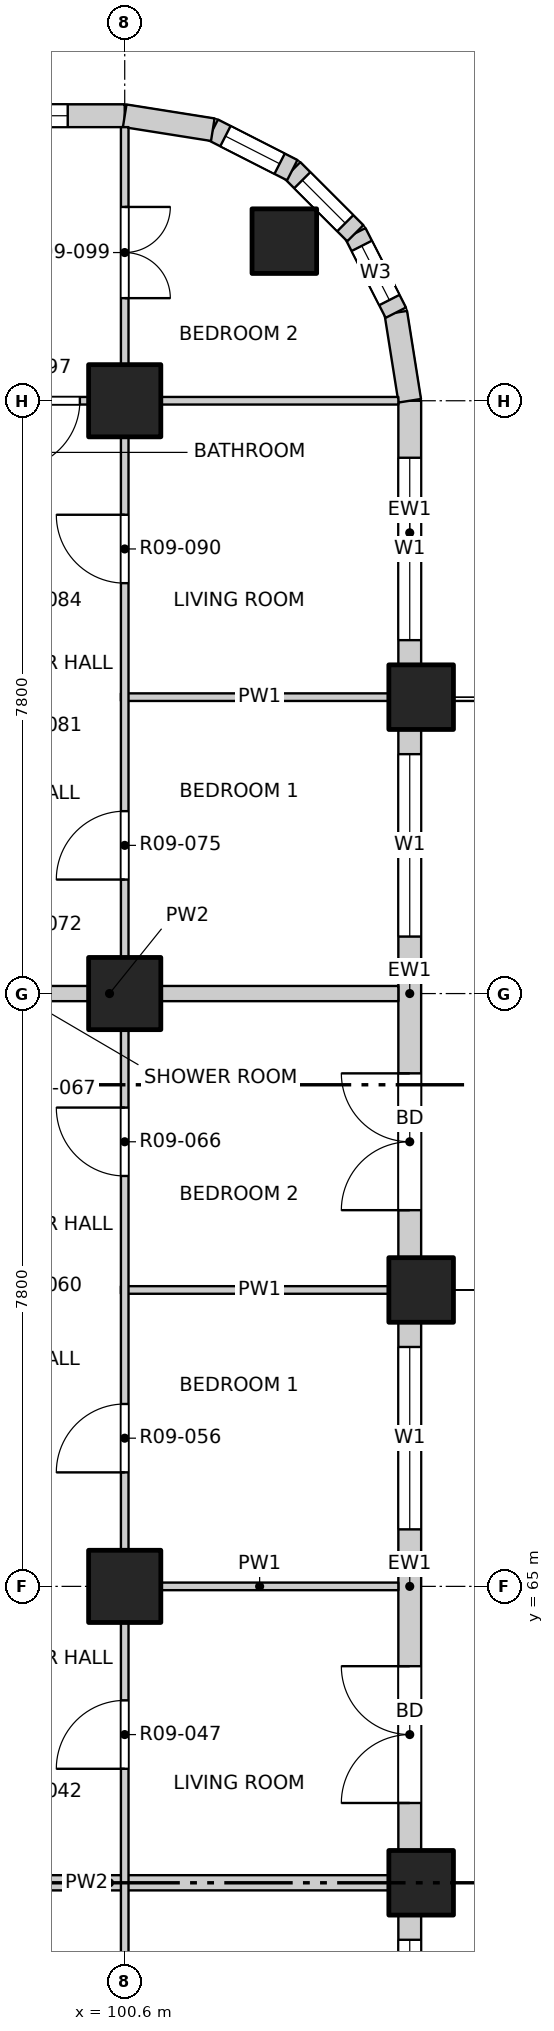
"""IFC4 building model, lengths in metres.
Left out: names, types, materials, properties, quantities, classifications, styles, units other than length and angle.
Written with IfcOpenShell. Run it as: python <this file> out.ifc"""

import sys

from ifc_helpers import new_model, si_unit, direction, frame, frame_2d, origin, origin_2d, place, context, subcontext, project, spatial, rectangle, extrude, element, fill, save


model = new_model("IFC4")
c1 = context("Model", 3, precision=1e-05, world=origin(), true_north=direction((0.0, 1.0)))
c2 = subcontext(c1, "Body", "Model", "MODEL_VIEW")
j1 = project(units=[si_unit("LENGTHUNIT", "METRE"), si_unit("PLANEANGLEUNIT", "RADIAN")], contexts=[c1])
p1 = place(None, origin())
s1 = spatial("IfcSite", under=j1, at=p1, CompositionType="ELEMENT")
p2 = place(p1, origin())
s2 = spatial("IfcBuilding", under=s1, at=p2, CompositionType="ELEMENT")
p3 = place(p2, frame((0.0, 0.0, 113.5)))
s3 = spatial("IfcBuildingStorey", under=s2, at=p3, CompositionType="ELEMENT", Elevation=113.5)
for number, where, z_axis, x_axis in (
    (1, (102.7, 82.7, -0.25), (0.0, 0.0, 1.0), (1.0, 0.0, 0.0)),
    (2, (104.5, 61.1, -0.25), (0.0, 0.0, 1.0), (1.0, 0.0, 0.0)),
    (3, (104.5, 68.9, -0.25), (0.0, 0.0, 1.0), (1.0, 0.0, 0.0)),
    (4, (104.5, 76.7, -0.25), (0.0, 0.0, 1.0), (1.0, 0.0, 0.0)),
):
    element("IfcColumn", number, at=place(p3, frame(where, z_axis=z_axis, x_axis=x_axis)), inside=s3, PredefinedType="COLUMN", context=c2, shape_type="SweptSolid", body=[
        extrude(rectangle(XDim=0.85, YDim=0.85, at=origin_2d()), origin(), (0.0, 0.0, 1.0), 3.35),
    ])
for number, where, z_axis, x_axis in (
    (5, (100.6, 65.0, -0.25), (0.0, 0.0, 1.0), (1.0, 0.0, 0.0)),
    (6, (100.6, 72.8, -0.25), (0.0, 0.0, 1.0), (1.0, 0.0, 0.0)),
    (7, (100.6, 80.6, -0.25), (0.0, 0.0, 1.0), (1.0, 0.0, 0.0)),
):
    element("IfcColumn", number, at=place(p3, frame(where, z_axis=z_axis, x_axis=x_axis)), inside=s3, PredefinedType="COLUMN", context=c2, shape_type="SweptSolid", body=[
        extrude(rectangle(XDim=0.95, YDim=0.95, at=origin_2d()), origin(), (0.0, 0.0, 1.0), 3.35),
    ])
p4 = place(p3, frame((104.35, 53.725, 0.0), z_axis=(0.0, 0.0, 1.0), x_axis=(0.0, 1.0, 0.0)))
e8 = element("IfcWall", 8, at=p4, inside=s3, PredefinedType="SOLIDWALL", context=c2, shape_type="SweptSolid", body=[
    extrude(rectangle(XDim=6.95, YDim=0.3, at=frame_2d((3.475, 0.0))), origin(), (0.0, 0.0, 1.0), 3.1),
])
p5 = place(p4, frame((0.625, 0.0, 0.0)))
e9 = element("IfcOpeningElement", 9, at=p5, cuts=e8, PredefinedType="OPENING", context=c2, shape_type="SweptSolid", body=[
    extrude(rectangle(XDim=1.8, YDim=2.4, at=frame_2d((0.9, 1.2))), frame((0.0, 0.16, 0.0), z_axis=(0.0, -1.0, 0.0), x_axis=(1.0, 0.0, 0.0)), (0.0, 0.0, 1.0), 0.32),
])
p6 = place(p4, frame((4.225, 0.0, 0.9)))
e10 = element("IfcOpeningElement", 10, at=p6, cuts=e8, PredefinedType="OPENING", context=c2, shape_type="SweptSolid", body=[
    extrude(rectangle(XDim=2.4, YDim=1.8, at=frame_2d((1.2, 0.9))), frame((0.0, 0.16, 0.0), z_axis=(0.0, -1.0, 0.0), x_axis=(1.0, 0.0, 0.0)), (0.0, 0.0, 1.0), 0.32),
])
p7 = place(p3, frame((104.35, 61.525, 0.0), z_axis=(0.0, 0.0, 1.0), x_axis=(0.0, 1.0, 0.0)))
e11 = element("IfcWall", 11, at=p7, inside=s3, PredefinedType="SOLIDWALL", context=c2, shape_type="SweptSolid", body=[
    extrude(rectangle(XDim=6.95, YDim=0.3, at=frame_2d((3.475, 0.0))), origin(), (0.0, 0.0, 1.0), 3.1),
])
p8 = place(p7, frame((0.625, 0.0, 0.0)))
e12 = element("IfcOpeningElement", 12, at=p8, cuts=e11, PredefinedType="OPENING", context=c2, shape_type="SweptSolid", body=[
    extrude(rectangle(XDim=1.8, YDim=2.4, at=frame_2d((0.9, 1.2))), frame((0.0, 0.16, 0.0), z_axis=(0.0, -1.0, 0.0), x_axis=(1.0, 0.0, 0.0)), (0.0, 0.0, 1.0), 0.32),
])
p9 = place(p7, frame((4.225, 0.0, 0.9)))
e13 = element("IfcOpeningElement", 13, at=p9, cuts=e11, PredefinedType="OPENING", context=c2, shape_type="SweptSolid", body=[
    extrude(rectangle(XDim=2.4, YDim=1.8, at=frame_2d((1.2, 0.9))), frame((0.0, 0.16, 0.0), z_axis=(0.0, -1.0, 0.0), x_axis=(1.0, 0.0, 0.0)), (0.0, 0.0, 1.0), 0.32),
])
p10 = place(p3, frame((104.35, 69.325, 0.0), z_axis=(0.0, 0.0, 1.0), x_axis=(0.0, 1.0, 0.0)))
e14 = element("IfcWall", 14, at=p10, inside=s3, PredefinedType="SOLIDWALL", context=c2, shape_type="SweptSolid", body=[
    extrude(rectangle(XDim=6.95, YDim=0.3, at=frame_2d((3.475, 0.0))), origin(), (0.0, 0.0, 1.0), 3.1),
])
p11 = place(p10, frame((0.625, 0.0, 0.0)))
e15 = element("IfcOpeningElement", 15, at=p11, cuts=e14, PredefinedType="OPENING", context=c2, shape_type="SweptSolid", body=[
    extrude(rectangle(XDim=1.8, YDim=2.4, at=frame_2d((0.9, 1.2))), frame((0.0, 0.16, 0.0), z_axis=(0.0, -1.0, 0.0), x_axis=(1.0, 0.0, 0.0)), (0.0, 0.0, 1.0), 0.32),
])
p12 = place(p10, frame((4.225, 0.0, 0.9)))
e16 = element("IfcOpeningElement", 16, at=p12, cuts=e14, PredefinedType="OPENING", context=c2, shape_type="SweptSolid", body=[
    extrude(rectangle(XDim=2.4, YDim=1.8, at=frame_2d((1.2, 0.9))), frame((0.0, 0.16, 0.0), z_axis=(0.0, -1.0, 0.0), x_axis=(1.0, 0.0, 0.0)), (0.0, 0.0, 1.0), 0.32),
])
p13 = place(p3, frame((104.35, 77.125, 0.0), z_axis=(0.0, 0.0, 1.0), x_axis=(0.0, 1.0, 0.0)))
e17 = element("IfcWall", 17, at=p13, inside=s3, PredefinedType="SOLIDWALL", context=c2, shape_type="SweptSolid", body=[
    extrude(rectangle(XDim=3.475, YDim=0.3, at=frame_2d((1.738, 0.0))), origin(), (0.0, 0.0, 1.0), 3.1),
])
p14 = place(p13, frame((0.325, 0.0, 0.9)))
e18 = element("IfcOpeningElement", 18, at=p14, cuts=e17, PredefinedType="OPENING", context=c2, shape_type="SweptSolid", body=[
    extrude(rectangle(XDim=2.4, YDim=1.8, at=frame_2d((1.2, 0.9))), frame((0.0, 0.16, 0.0), z_axis=(0.0, -1.0, 0.0), x_axis=(1.0, 0.0, 0.0)), (0.0, 0.0, 1.0), 0.32),
])
p15 = place(p3, frame((97.125, 84.35, 0.0), z_axis=(0.0, 0.0, 1.0), x_axis=(1.0, 0.0, 0.0)))
e19 = element("IfcWall", 19, at=p15, inside=s3, PredefinedType="SOLIDWALL", context=c2, shape_type="SweptSolid", body=[
    extrude(rectangle(XDim=3.475, YDim=0.3, at=frame_2d((1.738, 0.0))), origin(), (0.0, 0.0, 1.0), 3.1),
])
p16 = place(p15, frame((0.325, 0.0, 0.9)))
e20 = element("IfcOpeningElement", 20, at=p16, cuts=e19, PredefinedType="OPENING", context=c2, shape_type="SweptSolid", body=[
    extrude(rectangle(XDim=2.4, YDim=1.8, at=frame_2d((1.2, 0.9))), frame((0.0, 0.16, 0.0), z_axis=(0.0, -1.0, 0.0), x_axis=(1.0, 0.0, 0.0)), (0.0, 0.0, 1.0), 0.32),
])
p17 = place(p3, frame((104.35, 80.6, 0.0), z_axis=(0.0, 0.0, 1.0), x_axis=(-0.156496880861, 0.987678452879, 0.0)))
e21 = element("IfcWall", 21, at=p17, inside=s3, PredefinedType="SOLIDWALL", context=c2, shape_type="SweptSolid", body=[
    extrude(rectangle(XDim=1.173, YDim=0.3, at=frame_2d((0.586, 0.0))), origin(), (0.0, 0.0, 1.0), 3.1),
])
p18 = place(p3, frame((104.167, 81.759, 0.0), z_axis=(0.0, 0.0, 1.0), x_axis=(-0.454025524128, 0.890988677504, 0.0)))
e22 = element("IfcWall", 22, at=p18, inside=s3, PredefinedType="SOLIDWALL", context=c2, shape_type="SweptSolid", body=[
    extrude(rectangle(XDim=1.173, YDim=0.3, at=frame_2d((0.587, 0.0))), origin(), (0.0, 0.0, 1.0), 3.1),
])
p19 = place(p18, frame((0.187, 0.0, 0.9)))
e23 = element("IfcOpeningElement", 23, at=p19, cuts=e22, PredefinedType="OPENING", context=c2, shape_type="SweptSolid", body=[
    extrude(rectangle(XDim=0.8, YDim=1.2, at=frame_2d((0.4, 0.6))), frame((0.0, 0.16, 0.0), z_axis=(0.0, -1.0, 0.0), x_axis=(1.0, 0.0, 0.0)), (0.0, 0.0, 1.0), 0.32),
])
p20 = place(p3, frame((103.634, 82.804, 0.0), z_axis=(0.0, 0.0, 1.0), x_axis=(-0.707106781187, 0.707106781187, 0.0)))
e24 = element("IfcWall", 24, at=p20, inside=s3, PredefinedType="SOLIDWALL", context=c2, shape_type="SweptSolid", body=[
    extrude(rectangle(XDim=1.173, YDim=0.3, at=frame_2d((0.586, 0.0))), origin(), (0.0, 0.0, 1.0), 3.1),
])
p21 = place(p20, frame((0.187, 0.0, 0.9)))
e25 = element("IfcOpeningElement", 25, at=p21, cuts=e24, PredefinedType="OPENING", context=c2, shape_type="SweptSolid", body=[
    extrude(rectangle(XDim=0.8, YDim=1.2, at=frame_2d((0.4, 0.6))), frame((0.0, 0.16, 0.0), z_axis=(0.0, -1.0, 0.0), x_axis=(1.0, 0.0, 0.0)), (0.0, 0.0, 1.0), 0.32),
])
p22 = place(p3, frame((102.804, 83.634, 0.0), z_axis=(0.0, 0.0, 1.0), x_axis=(-0.890988677504, 0.454025524128, 0.0)))
e26 = element("IfcWall", 26, at=p22, inside=s3, PredefinedType="SOLIDWALL", context=c2, shape_type="SweptSolid", body=[
    extrude(rectangle(XDim=1.173, YDim=0.3, at=frame_2d((0.587, 0.0))), origin(), (0.0, 0.0, 1.0), 3.1),
])
p23 = place(p22, frame((0.187, 0.0, 0.9)))
e27 = element("IfcOpeningElement", 27, at=p23, cuts=e26, PredefinedType="OPENING", context=c2, shape_type="SweptSolid", body=[
    extrude(rectangle(XDim=0.8, YDim=1.2, at=frame_2d((0.4, 0.6))), frame((0.0, 0.16, 0.0), z_axis=(0.0, -1.0, 0.0), x_axis=(1.0, 0.0, 0.0)), (0.0, 0.0, 1.0), 0.32),
])
p24 = place(p3, frame((101.759, 84.167, 0.0), z_axis=(0.0, 0.0, 1.0), x_axis=(-0.987678452879, 0.156496880861, 0.0)))
e28 = element("IfcWall", 28, at=p24, inside=s3, PredefinedType="SOLIDWALL", context=c2, shape_type="SweptSolid", body=[
    extrude(rectangle(XDim=1.173, YDim=0.3, at=frame_2d((0.586, 0.0))), origin(), (0.0, 0.0, 1.0), 3.1),
])
p25 = place(p3, frame((96.6, 61.1, 0.0), z_axis=(0.0, 0.0, 1.0), x_axis=(1.0, 0.0, 0.0)))
e29 = element("IfcWall", 29, at=p25, inside=s3, PredefinedType="PARTITIONING", context=c2, shape_type="SweptSolid", body=[
    extrude(rectangle(XDim=7.6, YDim=0.2, at=frame_2d((3.8, 0.0))), origin(), (0.0, 0.0, 1.0), 3.1),
])
for number, where, z_axis, x_axis in (
    (30, (100.55, 65.0, 0.0), (0.0, 0.0, 1.0), (1.0, 0.0, 0.0)),
    (31, (100.55, 68.9, 0.0), (0.0, 0.0, 1.0), (1.0, 0.0, 0.0)),
):
    element("IfcWall", number, at=place(p3, frame(where, z_axis=z_axis, x_axis=x_axis)), inside=s3, PredefinedType="PARTITIONING", context=c2, shape_type="SweptSolid", body=[
        extrude(rectangle(XDim=3.65, YDim=0.1, at=frame_2d((1.825, 0.0))), origin(), (0.0, 0.0, 1.0), 3.1),
    ])
p26 = place(p3, frame((96.6, 72.8, 0.0), z_axis=(0.0, 0.0, 1.0), x_axis=(1.0, 0.0, 0.0)))
e32 = element("IfcWall", 32, at=p26, inside=s3, PredefinedType="PARTITIONING", context=c2, shape_type="SweptSolid", body=[
    extrude(rectangle(XDim=7.6, YDim=0.2, at=frame_2d((3.8, 0.0))), origin(), (0.0, 0.0, 1.0), 3.1),
])
p27 = place(p3, frame((100.55, 76.7, 0.0), z_axis=(0.0, 0.0, 1.0), x_axis=(1.0, 0.0, 0.0)))
e33 = element("IfcWall", 33, at=p27, inside=s3, PredefinedType="PARTITIONING", context=c2, shape_type="SweptSolid", body=[
    extrude(rectangle(XDim=3.65, YDim=0.1, at=frame_2d((1.825, 0.0))), origin(), (0.0, 0.0, 1.0), 3.1),
])
p28 = place(p3, frame((96.6, 80.6, 0.0), z_axis=(0.0, 0.0, 1.0), x_axis=(1.0, 0.0, 0.0)))
e34 = element("IfcWall", 34, at=p28, inside=s3, PredefinedType="PARTITIONING", context=c2, shape_type="SweptSolid", body=[
    extrude(rectangle(XDim=7.6, YDim=0.1, at=frame_2d((3.8, 0.0))), origin(), (0.0, 0.0, 1.0), 3.1),
])
p29 = place(p28, frame((2.51, 0.0, 0.0)))
e35 = element("IfcOpeningElement", 35, at=p29, cuts=e34, PredefinedType="OPENING", context=c2, shape_type="SweptSolid", body=[
    extrude(rectangle(XDim=0.9, YDim=2.1, at=frame_2d((0.45, 1.05))), frame((0.0, 0.06, 0.0), z_axis=(0.0, -1.0, 0.0), x_axis=(1.0, 0.0, 0.0)), (0.0, 0.0, 1.0), 0.12),
])
p30 = place(p3, frame((100.6, 45.8, 0.0), z_axis=(0.0, 0.0, 1.0), x_axis=(0.0, 1.0, 0.0)))
e36 = element("IfcWall", 36, at=p30, inside=s3, PredefinedType="PARTITIONING", context=c2, shape_type="SweptSolid", body=[
    extrude(rectangle(XDim=38.4, YDim=0.1, at=frame_2d((19.2, 0.0))), origin(), (0.0, 0.0, 1.0), 3.1),
])
p31 = place(p30, frame((1.05, 0.0, 0.0)))
e37 = element("IfcOpeningElement", 37, at=p31, cuts=e36, PredefinedType="OPENING", context=c2, shape_type="SweptSolid", body=[
    extrude(rectangle(XDim=1.2, YDim=2.1, at=frame_2d((0.6, 1.05))), frame((0.0, 0.06, 0.0), z_axis=(0.0, -1.0, 0.0), x_axis=(1.0, 0.0, 0.0)), (0.0, 0.0, 1.0), 0.12),
])
p32 = place(p30, frame((5.1, 0.0, 0.0)))
e38 = element("IfcOpeningElement", 38, at=p32, cuts=e36, PredefinedType="OPENING", context=c2, shape_type="SweptSolid", body=[
    extrude(rectangle(XDim=0.9, YDim=2.1, at=frame_2d((0.45, 1.05))), frame((0.0, 0.06, 0.0), z_axis=(0.0, -1.0, 0.0), x_axis=(1.0, 0.0, 0.0)), (0.0, 0.0, 1.0), 0.12),
])
p33 = place(p30, frame((9.625, 0.0, 0.0)))
e39 = element("IfcOpeningElement", 39, at=p33, cuts=e36, PredefinedType="OPENING", context=c2, shape_type="SweptSolid", body=[
    extrude(rectangle(XDim=1.2, YDim=2.1, at=frame_2d((0.6, 1.05))), frame((0.0, 0.06, 0.0), z_axis=(0.0, -1.0, 0.0), x_axis=(1.0, 0.0, 0.0)), (0.0, 0.0, 1.0), 0.12),
])
p34 = place(p30, frame((16.8, 0.0, 0.0)))
e40 = element("IfcOpeningElement", 40, at=p34, cuts=e36, PredefinedType="OPENING", context=c2, shape_type="SweptSolid", body=[
    extrude(rectangle(XDim=0.9, YDim=2.1, at=frame_2d((0.45, 1.05))), frame((0.0, 0.06, 0.0), z_axis=(0.0, -1.0, 0.0), x_axis=(1.0, 0.0, 0.0)), (0.0, 0.0, 1.0), 0.12),
])
p35 = place(p30, frame((20.7, 0.0, 0.0)))
e41 = element("IfcOpeningElement", 41, at=p35, cuts=e36, PredefinedType="OPENING", context=c2, shape_type="SweptSolid", body=[
    extrude(rectangle(XDim=0.9, YDim=2.1, at=frame_2d((0.45, 1.05))), frame((0.0, 0.06, 0.0), z_axis=(0.0, -1.0, 0.0), x_axis=(1.0, 0.0, 0.0)), (0.0, 0.0, 1.0), 0.12),
])
p36 = place(p30, frame((24.6, 0.0, 0.0)))
e42 = element("IfcOpeningElement", 42, at=p36, cuts=e36, PredefinedType="OPENING", context=c2, shape_type="SweptSolid", body=[
    extrude(rectangle(XDim=0.9, YDim=2.1, at=frame_2d((0.45, 1.05))), frame((0.0, 0.06, 0.0), z_axis=(0.0, -1.0, 0.0), x_axis=(1.0, 0.0, 0.0)), (0.0, 0.0, 1.0), 0.12),
])
p37 = place(p30, frame((28.5, 0.0, 0.0)))
e43 = element("IfcOpeningElement", 43, at=p37, cuts=e36, PredefinedType="OPENING", context=c2, shape_type="SweptSolid", body=[
    extrude(rectangle(XDim=0.9, YDim=2.1, at=frame_2d((0.45, 1.05))), frame((0.0, 0.06, 0.0), z_axis=(0.0, -1.0, 0.0), x_axis=(1.0, 0.0, 0.0)), (0.0, 0.0, 1.0), 0.12),
])
p38 = place(p30, frame((32.4, 0.0, 0.0)))
e44 = element("IfcOpeningElement", 44, at=p38, cuts=e36, PredefinedType="OPENING", context=c2, shape_type="SweptSolid", body=[
    extrude(rectangle(XDim=0.9, YDim=2.1, at=frame_2d((0.45, 1.05))), frame((0.0, 0.06, 0.0), z_axis=(0.0, -1.0, 0.0), x_axis=(1.0, 0.0, 0.0)), (0.0, 0.0, 1.0), 0.12),
])
p39 = place(p30, frame((36.15, 0.0, 0.0)))
e45 = element("IfcOpeningElement", 45, at=p39, cuts=e36, PredefinedType="OPENING", context=c2, shape_type="SweptSolid", body=[
    extrude(rectangle(XDim=1.2, YDim=2.1, at=frame_2d((0.6, 1.05))), frame((0.0, 0.06, 0.0), z_axis=(0.0, -1.0, 0.0), x_axis=(1.0, 0.0, 0.0)), (0.0, 0.0, 1.0), 0.12),
])
p40 = place(p6, origin())
e46 = element("IfcWindow", 46, at=p40, inside=s3, PartitioningType="DOUBLE_PANEL_VERTICAL", PredefinedType="WINDOW", context=c2, shape_type="SweptSolid", body=[
    extrude(rectangle(XDim=2.4, YDim=1.8, at=frame_2d((1.2, 0.9))), frame((0.0, 0.03, 0.0), z_axis=(0.0, -1.0, 0.0), x_axis=(1.0, 0.0, 0.0)), (0.0, 0.0, 1.0), 0.06),
])
fill(e10, e46)
p41 = place(p8, origin())
e47 = element("IfcDoor", 47, at=p41, inside=s3, OperationType="DOUBLE_DOOR_SINGLE_SWING", PredefinedType="DOOR", context=c2, shape_type="SweptSolid", body=[
    extrude(rectangle(XDim=1.8, YDim=2.4, at=frame_2d((0.9, 1.2))), frame((0.0, 0.025, 0.0), z_axis=(0.0, -1.0, 0.0), x_axis=(1.0, 0.0, 0.0)), (0.0, 0.0, 1.0), 0.05),
])
fill(e12, e47)
p42 = place(p9, origin())
e48 = element("IfcWindow", 48, at=p42, inside=s3, PartitioningType="DOUBLE_PANEL_VERTICAL", PredefinedType="WINDOW", context=c2, shape_type="SweptSolid", body=[
    extrude(rectangle(XDim=2.4, YDim=1.8, at=frame_2d((1.2, 0.9))), frame((0.0, 0.03, 0.0), z_axis=(0.0, -1.0, 0.0), x_axis=(1.0, 0.0, 0.0)), (0.0, 0.0, 1.0), 0.06),
])
fill(e13, e48)
p43 = place(p11, origin())
e49 = element("IfcDoor", 49, at=p43, inside=s3, OperationType="DOUBLE_DOOR_SINGLE_SWING", PredefinedType="DOOR", context=c2, shape_type="SweptSolid", body=[
    extrude(rectangle(XDim=1.8, YDim=2.4, at=frame_2d((0.9, 1.2))), frame((0.0, 0.025, 0.0), z_axis=(0.0, -1.0, 0.0), x_axis=(1.0, 0.0, 0.0)), (0.0, 0.0, 1.0), 0.05),
])
fill(e15, e49)
p44 = place(p12, origin())
e50 = element("IfcWindow", 50, at=p44, inside=s3, PartitioningType="DOUBLE_PANEL_VERTICAL", PredefinedType="WINDOW", context=c2, shape_type="SweptSolid", body=[
    extrude(rectangle(XDim=2.4, YDim=1.8, at=frame_2d((1.2, 0.9))), frame((0.0, 0.03, 0.0), z_axis=(0.0, -1.0, 0.0), x_axis=(1.0, 0.0, 0.0)), (0.0, 0.0, 1.0), 0.06),
])
fill(e16, e50)
p45 = place(p14, origin())
e51 = element("IfcWindow", 51, at=p45, inside=s3, PartitioningType="DOUBLE_PANEL_VERTICAL", PredefinedType="WINDOW", context=c2, shape_type="SweptSolid", body=[
    extrude(rectangle(XDim=2.4, YDim=1.8, at=frame_2d((1.2, 0.9))), frame((0.0, 0.03, 0.0), z_axis=(0.0, -1.0, 0.0), x_axis=(1.0, 0.0, 0.0)), (0.0, 0.0, 1.0), 0.06),
])
fill(e18, e51)
p46 = place(p16, origin())
e52 = element("IfcWindow", 52, at=p46, inside=s3, PartitioningType="DOUBLE_PANEL_VERTICAL", PredefinedType="WINDOW", context=c2, shape_type="SweptSolid", body=[
    extrude(rectangle(XDim=2.4, YDim=1.8, at=frame_2d((1.2, 0.9))), frame((0.0, 0.03, 0.0), z_axis=(0.0, -1.0, 0.0), x_axis=(1.0, 0.0, 0.0)), (0.0, 0.0, 1.0), 0.06),
])
fill(e20, e52)
p47 = place(p19, origin())
e53 = element("IfcWindow", 53, at=p47, inside=s3, PartitioningType="SINGLE_PANEL", PredefinedType="WINDOW", context=c2, shape_type="SweptSolid", body=[
    extrude(rectangle(XDim=0.8, YDim=1.2, at=frame_2d((0.4, 0.6))), frame((0.0, 0.03, 0.0), z_axis=(0.0, -1.0, 0.0), x_axis=(1.0, 0.0, 0.0)), (0.0, 0.0, 1.0), 0.06),
])
fill(e23, e53)
p48 = place(p21, origin())
e54 = element("IfcWindow", 54, at=p48, inside=s3, PartitioningType="SINGLE_PANEL", PredefinedType="WINDOW", context=c2, shape_type="SweptSolid", body=[
    extrude(rectangle(XDim=0.8, YDim=1.2, at=frame_2d((0.4, 0.6))), frame((0.0, 0.03, 0.0), z_axis=(0.0, -1.0, 0.0), x_axis=(1.0, 0.0, 0.0)), (0.0, 0.0, 1.0), 0.06),
])
fill(e25, e54)
p49 = place(p23, origin())
e55 = element("IfcWindow", 55, at=p49, inside=s3, PartitioningType="SINGLE_PANEL", PredefinedType="WINDOW", context=c2, shape_type="SweptSolid", body=[
    extrude(rectangle(XDim=0.8, YDim=1.2, at=frame_2d((0.4, 0.6))), frame((0.0, 0.03, 0.0), z_axis=(0.0, -1.0, 0.0), x_axis=(1.0, 0.0, 0.0)), (0.0, 0.0, 1.0), 0.06),
])
fill(e27, e55)
p50 = place(p34, origin())
e56 = element("IfcDoor", 56, at=p50, inside=s3, OperationType="SINGLE_SWING_LEFT", PredefinedType="DOOR", context=c2, shape_type="SweptSolid", body=[
    extrude(rectangle(XDim=0.9, YDim=2.1, at=frame_2d((0.45, 1.05))), frame((0.0, 0.025, 0.0), z_axis=(0.0, -1.0, 0.0), x_axis=(1.0, 0.0, 0.0)), (0.0, 0.0, 1.0), 0.05),
])
fill(e40, e56)
p51 = place(p35, origin())
e57 = element("IfcDoor", 57, at=p51, inside=s3, OperationType="SINGLE_SWING_LEFT", PredefinedType="DOOR", context=c2, shape_type="SweptSolid", body=[
    extrude(rectangle(XDim=0.9, YDim=2.1, at=frame_2d((0.45, 1.05))), frame((0.0, 0.025, 0.0), z_axis=(0.0, -1.0, 0.0), x_axis=(1.0, 0.0, 0.0)), (0.0, 0.0, 1.0), 0.05),
])
fill(e41, e57)
p52 = place(p36, origin())
e58 = element("IfcDoor", 58, at=p52, inside=s3, OperationType="SINGLE_SWING_RIGHT", PredefinedType="DOOR", context=c2, shape_type="SweptSolid", body=[
    extrude(rectangle(XDim=0.9, YDim=2.1, at=frame_2d((0.45, 1.05))), frame((0.0, 0.025, 0.0), z_axis=(0.0, -1.0, 0.0), x_axis=(1.0, 0.0, 0.0)), (0.0, 0.0, 1.0), 0.05),
])
fill(e42, e58)
p53 = place(p37, origin())
e59 = element("IfcDoor", 59, at=p53, inside=s3, OperationType="SINGLE_SWING_LEFT", PredefinedType="DOOR", context=c2, shape_type="SweptSolid", body=[
    extrude(rectangle(XDim=0.9, YDim=2.1, at=frame_2d((0.45, 1.05))), frame((0.0, 0.025, 0.0), z_axis=(0.0, -1.0, 0.0), x_axis=(1.0, 0.0, 0.0)), (0.0, 0.0, 1.0), 0.05),
])
fill(e43, e59)
p54 = place(p38, origin())
e60 = element("IfcDoor", 60, at=p54, inside=s3, OperationType="SINGLE_SWING_RIGHT", PredefinedType="DOOR", context=c2, shape_type="SweptSolid", body=[
    extrude(rectangle(XDim=0.9, YDim=2.1, at=frame_2d((0.45, 1.05))), frame((0.0, 0.025, 0.0), z_axis=(0.0, -1.0, 0.0), x_axis=(1.0, 0.0, 0.0)), (0.0, 0.0, 1.0), 0.05),
])
fill(e44, e60)
p55 = place(p29, origin())
e61 = element("IfcDoor", 61, at=p55, inside=s3, OperationType="SINGLE_SWING_RIGHT", PredefinedType="DOOR", context=c2, shape_type="SweptSolid", body=[
    extrude(rectangle(XDim=0.9, YDim=2.1, at=frame_2d((0.45, 1.05))), frame((0.0, 0.025, 0.0), z_axis=(0.0, -1.0, 0.0), x_axis=(1.0, 0.0, 0.0)), (0.0, 0.0, 1.0), 0.05),
])
fill(e35, e61)
p56 = place(p39, origin())
e62 = element("IfcDoor", 62, at=p56, inside=s3, OperationType="DOUBLE_DOOR_SINGLE_SWING", PredefinedType="DOOR", context=c2, shape_type="SweptSolid", body=[
    extrude(rectangle(XDim=1.2, YDim=2.1, at=frame_2d((0.6, 1.05))), frame((0.0, 0.025, 0.0), z_axis=(0.0, -1.0, 0.0), x_axis=(1.0, 0.0, 0.0)), (0.0, 0.0, 1.0), 0.05),
])
fill(e45, e62)
save(model, sys.argv[1])
